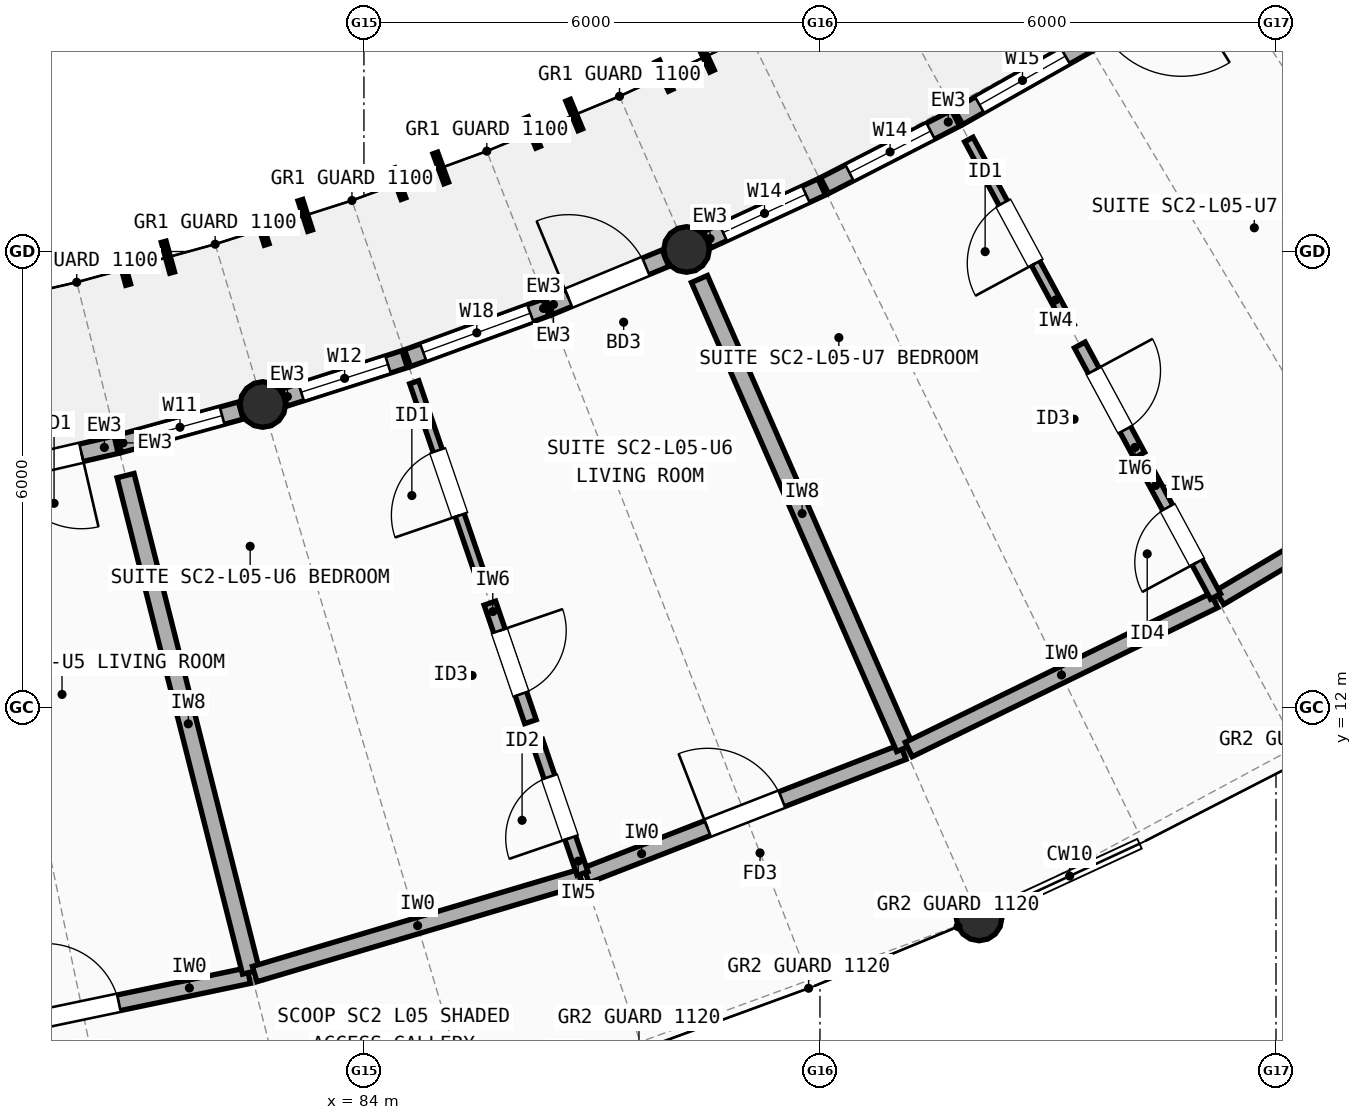
"""IFC4 building model, lengths in metres.
Left out: names, types, materials, properties, quantities, classifications, styles, units other than length and angle.
Written with IfcOpenShell. Run it as: python <this file> out.ifc"""

import sys

from ifc_helpers import new_model, si_unit, direction, frame, frame_2d, origin, origin_2d, place, context, subcontext, project, spatial, rectangle, circle, extrude, element, fill, save


model = new_model("IFC4")
c1 = context("Model", 3, precision=1e-05, world=origin(), true_north=direction((0.0, 1.0)))
c2 = subcontext(c1, "Body", "Model", "MODEL_VIEW")
j1 = project(units=[si_unit("LENGTHUNIT", "METRE"), si_unit("PLANEANGLEUNIT", "RADIAN")], contexts=[c1])
p1 = place(None, origin())
s1 = spatial("IfcSite", under=j1, at=p1, CompositionType="ELEMENT")
p2 = place(p1, origin())
s2 = spatial("IfcBuilding", under=s1, at=p2, CompositionType="ELEMENT")
p3 = place(p2, frame((0.0, 0.0, 17.3)))
s3 = spatial("IfcBuildingStorey", under=s2, at=p3, CompositionType="ELEMENT", Elevation=17.3)
for number, where, z_axis, x_axis in (
    (1, (82.669, 15.988, 0.0), (0.0, 0.0, 1.0), (1.0, 0.0, 0.0)),
    (2, (88.245, 18.027, 0.0), (0.0, 0.0, 1.0), (1.0, 0.0, 0.0)),
    (3, (92.094, 9.232, 0.0), (0.0, 0.0, 1.0), (1.0, 0.0, 0.0)),
):
    element("IfcColumn", number, at=place(p3, frame(where, z_axis=z_axis, x_axis=x_axis)), inside=s3, PredefinedType="COLUMN", context=c2, shape_type="SweptSolid", body=[
        extrude(circle(Radius=0.3, at=origin_2d()), origin(), (0.0, 0.0, 1.0), 2.94),
    ])
p4 = place(p3, frame((78.85, 15.022, 0.0), z_axis=(0.0, 0.0, 1.0), x_axis=(0.974359373104, 0.224997360081, 0.0)))
e4 = element("IfcWall", 4, at=p4, inside=s3, PredefinedType="STANDARD", context=c2, shape_type="SweptSolid", body=[
    extrude(rectangle(XDim=1.94, YDim=0.235, at=frame_2d((0.97, 0.0))), origin(), (0.0, 0.0, 1.0), 2.676),
])
p5 = place(p4, frame((0.47, 0.0, 0.0)))
e5 = element("IfcOpeningElement", 5, at=p5, cuts=e4, PredefinedType="OPENING", context=c2, shape_type="SweptSolid", body=[
    extrude(rectangle(XDim=1.0, YDim=2.15, at=frame_2d((0.5, 1.075))), frame((0.0, 0.127, 0.0), z_axis=(0.0, -1.0, 0.0), x_axis=(1.0, 0.0, 0.0)), (0.0, 0.0, 1.0), 0.255),
])
p6 = place(p3, frame((80.779, 15.468, 0.0), z_axis=(0.0, 0.0, 1.0), x_axis=(0.964276805489, 0.264896663619, 0.0)))
e6 = element("IfcWall", 6, at=p6, inside=s3, PredefinedType="STANDARD", context=c2, shape_type="SweptSolid", body=[
    extrude(rectangle(XDim=1.66, YDim=0.235, at=frame_2d((0.83, 0.0))), origin(), (0.0, 0.0, 1.0), 2.676),
])
p7 = place(p6, frame((0.255, 0.0, 0.85)))
e7 = element("IfcOpeningElement", 7, at=p7, cuts=e6, PredefinedType="OPENING", context=c2, shape_type="SweptSolid", body=[
    extrude(rectangle(XDim=1.15, YDim=1.45, at=frame_2d((0.575, 0.725))), frame((0.0, 0.127, 0.0), z_axis=(0.0, -1.0, 0.0), x_axis=(1.0, 0.0, 0.0)), (0.0, 0.0, 1.0), 0.255),
])
p8 = place(p3, frame((82.955, 16.079, 0.0), z_axis=(0.0, 0.0, 1.0), x_axis=(0.952523149859, 0.304466170508, 0.0)))
e8 = element("IfcWall", 8, at=p8, inside=s3, PredefinedType="STANDARD", context=c2, shape_type="SweptSolid", body=[
    extrude(rectangle(XDim=1.66, YDim=0.235, at=frame_2d((0.83, 0.0))), origin(), (0.0, 0.0, 1.0), 2.676),
])
p9 = place(p8, frame((0.23, 0.0, 0.85)))
e9 = element("IfcOpeningElement", 9, at=p9, cuts=e8, PredefinedType="OPENING", context=c2, shape_type="SweptSolid", body=[
    extrude(rectangle(XDim=1.2, YDim=1.35, at=frame_2d((0.6, 0.675))), frame((0.0, 0.127, 0.0), z_axis=(0.0, -1.0, 0.0), x_axis=(1.0, 0.0, 0.0)), (0.0, 0.0, 1.0), 0.255),
])
p10 = place(p3, frame((84.574, 16.597, 0.0), z_axis=(0.0, 0.0, 1.0), x_axis=(0.939178301307, 0.343429932235, 0.0)))
e10 = element("IfcWall", 10, at=p10, inside=s3, PredefinedType="STANDARD", context=c2, shape_type="SweptSolid", body=[
    extrude(rectangle(XDim=1.94, YDim=0.235, at=frame_2d((0.97, 0.0))), origin(), (0.0, 0.0, 1.0), 2.676),
])
p11 = place(p10, frame((0.22, 0.0, 0.85)))
e11 = element("IfcOpeningElement", 11, at=p11, cuts=e10, PredefinedType="OPENING", context=c2, shape_type="SweptSolid", body=[
    extrude(rectangle(XDim=1.5, YDim=1.4, at=frame_2d((0.75, 0.7))), frame((0.0, 0.127, 0.0), z_axis=(0.0, -1.0, 0.0), x_axis=(1.0, 0.0, 0.0)), (0.0, 0.0, 1.0), 0.255),
])
p12 = place(p3, frame((86.433, 17.278, 0.0), z_axis=(0.0, 0.0, 1.0), x_axis=(0.924165494985, 0.38199232699, 0.0)))
e12 = element("IfcWall", 12, at=p12, inside=s3, PredefinedType="STANDARD", context=c2, shape_type="SweptSolid", body=[
    extrude(rectangle(XDim=1.66, YDim=0.235, at=frame_2d((0.83, 0.0))), origin(), (0.0, 0.0, 1.0), 2.676),
])
p13 = place(p12, frame((0.28, 0.0, 0.0)))
e13 = element("IfcOpeningElement", 13, at=p13, cuts=e12, PredefinedType="OPENING", context=c2, shape_type="SweptSolid", body=[
    extrude(rectangle(XDim=1.1, YDim=2.15, at=frame_2d((0.55, 1.075))), frame((0.0, 0.127, 0.0), z_axis=(0.0, -1.0, 0.0), x_axis=(1.0, 0.0, 0.0)), (0.0, 0.0, 1.0), 0.255),
])
p14 = place(p3, frame((88.517, 18.153, 0.0), z_axis=(0.0, 0.0, 1.0), x_axis=(0.907575902742, 0.419888057418, 0.0)))
e14 = element("IfcWall", 14, at=p14, inside=s3, PredefinedType="STANDARD", context=c2, shape_type="SweptSolid", body=[
    extrude(rectangle(XDim=1.66, YDim=0.235, at=frame_2d((0.83, 0.0))), origin(), (0.0, 0.0, 1.0), 2.676),
])
p15 = place(p14, frame((0.23, 0.0, 0.85)))
e15 = element("IfcOpeningElement", 15, at=p15, cuts=e14, PredefinedType="OPENING", context=c2, shape_type="SweptSolid", body=[
    extrude(rectangle(XDim=1.2, YDim=1.5, at=frame_2d((0.6, 0.75))), frame((0.0, 0.127, 0.0), z_axis=(0.0, -1.0, 0.0), x_axis=(1.0, 0.0, 0.0)), (0.0, 0.0, 1.0), 0.255),
])
p16 = place(p3, frame((90.06, 18.867, 0.0), z_axis=(0.0, 0.0, 1.0), x_axis=(0.889517261343, 0.456901566832, 0.0)))
e16 = element("IfcWall", 16, at=p16, inside=s3, PredefinedType="STANDARD", context=c2, shape_type="SweptSolid", body=[
    extrude(rectangle(XDim=1.94, YDim=0.235, at=frame_2d((0.97, 0.0))), origin(), (0.0, 0.0, 1.0), 2.676),
])
p17 = place(p16, frame((0.37, 0.0, 0.85)))
e17 = element("IfcOpeningElement", 17, at=p17, cuts=e16, PredefinedType="OPENING", context=c2, shape_type="SweptSolid", body=[
    extrude(rectangle(XDim=1.2, YDim=1.5, at=frame_2d((0.6, 0.75))), frame((0.0, 0.127, 0.0), z_axis=(0.0, -1.0, 0.0), x_axis=(1.0, 0.0, 0.0)), (0.0, 0.0, 1.0), 0.255),
])
p18 = place(p3, frame((91.821, 19.772, 0.0), z_axis=(0.0, 0.0, 1.0), x_axis=(0.86993400964, 0.493168144623, 0.0)))
e18 = element("IfcWall", 18, at=p18, inside=s3, PredefinedType="STANDARD", context=c2, shape_type="SweptSolid", body=[
    extrude(rectangle(XDim=1.94, YDim=0.235, at=frame_2d((0.97, 0.0))), origin(), (0.0, 0.0, 1.0), 2.676),
])
p19 = place(p18, frame((0.32, 0.0, 0.85)))
e19 = element("IfcOpeningElement", 19, at=p19, cuts=e18, PredefinedType="OPENING", context=c2, shape_type="SweptSolid", body=[
    extrude(rectangle(XDim=1.3, YDim=1.45, at=frame_2d((0.65, 0.725))), frame((0.0, 0.127, 0.0), z_axis=(0.0, -1.0, 0.0), x_axis=(1.0, 0.0, 0.0)), (0.0, 0.0, 1.0), 0.255),
])
p20 = place(p3, frame((78.107, 7.558, 0.0), z_axis=(0.0, 0.0, 1.0), x_axis=(0.978806148413, 0.204788973894, 0.0)))
e20 = element("IfcWall", 20, at=p20, inside=s3, PredefinedType="SOLIDWALL", context=c2, shape_type="SweptSolid", body=[
    extrude(rectangle(XDim=4.473, YDim=0.21, at=frame_2d((2.236, 0.0))), origin(), (0.0, 0.0, 1.0), 2.754),
])
p21 = place(p20, frame((1.747, 0.0, 0.0)))
e21 = element("IfcOpeningElement", 21, at=p21, cuts=e20, PredefinedType="OPENING", context=c2, shape_type="SweptSolid", body=[
    extrude(rectangle(XDim=0.98, YDim=2.15, at=frame_2d((0.49, 1.075))), frame((0.0, 0.115, 0.0), z_axis=(0.0, -1.0, 0.0), x_axis=(1.0, 0.0, 0.0)), (0.0, 0.0, 1.0), 0.23),
])
p22 = place(p3, frame((80.864, 15.052, 0.0), z_axis=(0.0, 0.0, 1.0), x_axis=(0.244982481903, -0.969527505314, 0.0)))
e22 = element("IfcWall", 22, at=p22, inside=s3, PredefinedType="SOLIDWALL", context=c2, shape_type="SweptSolid", body=[
    extrude(rectangle(XDim=6.736, YDim=0.23, at=frame_2d((3.368, 0.0))), origin(), (0.0, 0.0, 1.0), 2.714),
])
p23 = place(p3, frame((82.562, 8.494, 0.0), z_axis=(0.0, 0.0, 1.0), x_axis=(0.958602413557, 0.28474798107, 0.0)))
e23 = element("IfcWall", 23, at=p23, inside=s3, PredefinedType="SOLIDWALL", context=c2, shape_type="SweptSolid", body=[
    extrude(rectangle(XDim=4.473, YDim=0.21, at=frame_2d((2.236, 0.0))), origin(), (0.0, 0.0, 1.0), 2.734),
])
p24 = place(p3, frame((86.926, 9.793, 0.0), z_axis=(0.0, 0.0, 1.0), x_axis=(0.931847867525, 0.362849213571, 0.0)))
e24 = element("IfcWall", 24, at=p24, inside=s3, PredefinedType="SOLIDWALL", context=c2, shape_type="SweptSolid", body=[
    extrude(rectangle(XDim=4.473, YDim=0.21, at=frame_2d((2.237, 0.0))), origin(), (0.0, 0.0, 1.0), 2.714),
])
p25 = place(p24, frame((1.712, 0.0, 0.0)))
e25 = element("IfcOpeningElement", 25, at=p25, cuts=e24, PredefinedType="OPENING", context=c2, shape_type="SweptSolid", body=[
    extrude(rectangle(XDim=1.05, YDim=2.15, at=frame_2d((0.525, 1.075))), frame((0.0, 0.115, 0.0), z_axis=(0.0, -1.0, 0.0), x_axis=(1.0, 0.0, 0.0)), (0.0, 0.0, 1.0), 0.23),
])
p26 = place(p3, frame((84.662, 16.28, 0.0), z_axis=(0.0, 0.0, 1.0), x_axis=(0.32401221778, -0.94605289637, 0.0)))
e26 = element("IfcWall", 26, at=p26, inside=s3, PredefinedType="PARTITIONING", context=c2, shape_type="SweptSolid", body=[
    extrude(rectangle(XDim=2.8, YDim=0.125, at=frame_2d((1.4, 0.0))), origin(), (0.0, 0.0, 1.0), 2.754),
])
p27 = place(p26, frame((0.95, 0.0, 0.0)))
e27 = element("IfcOpeningElement", 27, at=p27, cuts=e26, PredefinedType="OPENING", context=c2, shape_type="SweptSolid", body=[
    extrude(rectangle(XDim=0.9, YDim=2.1, at=frame_2d((0.45, 1.05))), frame((0.0, 0.073, 0.0), z_axis=(0.0, -1.0, 0.0), x_axis=(1.0, 0.0, 0.0)), (0.0, 0.0, 1.0), 0.145),
])
p28 = place(p3, frame((85.657, 13.374, 0.0), z_axis=(0.0, 0.0, 1.0), x_axis=(0.324127376206, -0.946013448104, 0.0)))
e28 = element("IfcWall", 28, at=p28, inside=s3, PredefinedType="PLUMBINGWALL", context=c2, shape_type="SweptSolid", body=[
    extrude(rectangle(XDim=1.648, YDim=0.16, at=frame_2d((0.824, 0.0))), origin(), (0.0, 0.0, 1.0), 2.754),
])
p29 = place(p28, frame((0.384, 0.0, 0.0)))
e29 = element("IfcOpeningElement", 29, at=p29, cuts=e28, PredefinedType="OPENING", context=c2, shape_type="SweptSolid", body=[
    extrude(rectangle(XDim=0.88, YDim=2.1, at=frame_2d((0.44, 1.05))), frame((0.0, 0.09, 0.0), z_axis=(0.0, -1.0, 0.0), x_axis=(1.0, 0.0, 0.0)), (0.0, 0.0, 1.0), 0.18),
])
p30 = place(p3, frame((86.279, 11.558, 0.0), z_axis=(0.0, 0.0, 1.0), x_axis=(0.323978335312, -0.946064500046, 0.0)))
e30 = element("IfcWall", 30, at=p30, inside=s3, PredefinedType="PARTITIONING", context=c2, shape_type="SweptSolid", body=[
    extrude(rectangle(XDim=1.84, YDim=0.15, at=frame_2d((0.92, 0.0))), origin(), (0.0, 0.0, 1.0), 2.754),
])
p31 = place(p30, frame((0.495, 0.0, 0.0)))
e31 = element("IfcOpeningElement", 31, at=p31, cuts=e30, PredefinedType="OPENING", context=c2, shape_type="SweptSolid", body=[
    extrude(rectangle(XDim=0.85, YDim=2.1, at=frame_2d((0.425, 1.05))), frame((0.0, 0.085, 0.0), z_axis=(0.0, -1.0, 0.0), x_axis=(1.0, 0.0, 0.0)), (0.0, 0.0, 1.0), 0.17),
])
p32 = place(p3, frame((88.415, 17.638, 0.0), z_axis=(0.0, 0.0, 1.0), x_axis=(0.400932910895, -0.916107417807, 0.0)))
e32 = element("IfcWall", 32, at=p32, inside=s3, PredefinedType="SOLIDWALL", context=c2, shape_type="SweptSolid", body=[
    extrude(rectangle(XDim=6.736, YDim=0.23, at=frame_2d((3.368, 0.0))), origin(), (0.0, 0.0, 1.0), 2.734),
])
p33 = place(p3, frame((91.167, 11.448, 0.0), z_axis=(0.0, 0.0, 1.0), x_axis=(0.898794149603, 0.438370934985, 0.0)))
e33 = element("IfcWall", 33, at=p33, inside=s3, PredefinedType="SOLIDWALL", context=c2, shape_type="SweptSolid", body=[
    extrude(rectangle(XDim=4.473, YDim=0.21, at=frame_2d((2.236, 0.0))), origin(), (0.0, 0.0, 1.0), 2.754),
])
p34 = place(p3, frame((95.258, 13.447, 0.0), z_axis=(0.0, 0.0, 1.0), x_axis=(0.859614290038, 0.510943511909, 0.0)))
e34 = element("IfcWall", 34, at=p34, inside=s3, PredefinedType="SOLIDWALL", context=c2, shape_type="SweptSolid", body=[
    extrude(rectangle(XDim=4.473, YDim=0.21, at=frame_2d((2.236, 0.0))), origin(), (0.0, 0.0, 1.0), 2.734),
])
p35 = place(p34, frame((1.737, 0.0, 0.0)))
e35 = element("IfcOpeningElement", 35, at=p35, cuts=e34, PredefinedType="OPENING", context=c2, shape_type="SweptSolid", body=[
    extrude(rectangle(XDim=1.0, YDim=2.15, at=frame_2d((0.5, 1.075))), frame((0.0, 0.115, 0.0), z_axis=(0.0, -1.0, 0.0), x_axis=(1.0, 0.0, 0.0)), (0.0, 0.0, 1.0), 0.23),
])
p36 = place(p3, frame((91.959, 19.474, 0.0), z_axis=(0.0, 0.0, 1.0), x_axis=(0.475103009949, -0.879930184695, 0.0)))
e36 = element("IfcWall", 36, at=p36, inside=s3, PredefinedType="PARTITIONING", context=c2, shape_type="SweptSolid", body=[
    extrude(rectangle(XDim=2.8, YDim=0.125, at=frame_2d((1.4, 0.0))), origin(), (0.0, 0.0, 1.0), 2.714),
])
p37 = place(p36, frame((0.95, 0.0, 0.0)))
e37 = element("IfcOpeningElement", 37, at=p37, cuts=e36, PredefinedType="OPENING", context=c2, shape_type="SweptSolid", body=[
    extrude(rectangle(XDim=0.9, YDim=2.1, at=frame_2d((0.45, 1.05))), frame((0.0, 0.073, 0.0), z_axis=(0.0, -1.0, 0.0), x_axis=(1.0, 0.0, 0.0)), (0.0, 0.0, 1.0), 0.145),
])
p38 = place(p3, frame((93.418, 16.771, 0.0), z_axis=(0.0, 0.0, 1.0), x_axis=(0.475080097018, -0.879942555749, 0.0)))
e38 = element("IfcWall", 38, at=p38, inside=s3, PredefinedType="PLUMBINGWALL", context=c2, shape_type="SweptSolid", body=[
    extrude(rectangle(XDim=1.648, YDim=0.16, at=frame_2d((0.824, 0.0))), origin(), (0.0, 0.0, 1.0), 2.714),
])
p39 = place(p38, frame((0.384, 0.0, 0.0)))
e39 = element("IfcOpeningElement", 39, at=p39, cuts=e38, PredefinedType="OPENING", context=c2, shape_type="SweptSolid", body=[
    extrude(rectangle(XDim=0.88, YDim=2.1, at=frame_2d((0.44, 1.05))), frame((0.0, 0.09, 0.0), z_axis=(0.0, -1.0, 0.0), x_axis=(1.0, 0.0, 0.0)), (0.0, 0.0, 1.0), 0.18),
])
p40 = place(p3, frame((94.331, 15.081, 0.0), z_axis=(0.0, 0.0, 1.0), x_axis=(0.475017414672, -0.879976395001, 0.0)))
e40 = element("IfcWall", 40, at=p40, inside=s3, PredefinedType="PARTITIONING", context=c2, shape_type="SweptSolid", body=[
    extrude(rectangle(XDim=1.84, YDim=0.15, at=frame_2d((0.92, 0.0))), origin(), (0.0, 0.0, 1.0), 2.714),
])
p41 = place(p40, frame((0.51, 0.0, 0.0)))
e41 = element("IfcOpeningElement", 41, at=p41, cuts=e40, PredefinedType="OPENING", context=c2, shape_type="SweptSolid", body=[
    extrude(rectangle(XDim=0.82, YDim=2.08, at=frame_2d((0.41, 1.04))), frame((0.0, 0.085, 0.0), z_axis=(0.0, -1.0, 0.0), x_axis=(1.0, 0.0, 0.0)), (0.0, 0.0, 1.0), 0.17),
])
p42 = place(p5, origin())
e42 = element("IfcDoor", 42, at=p42, inside=s3, OperationType="SINGLE_SWING_RIGHT", PredefinedType="DOOR", context=c2, shape_type="SweptSolid", body=[
    extrude(rectangle(XDim=1.0, YDim=2.15, at=frame_2d((0.5, 1.075))), frame((0.0, 0.025, 0.0), z_axis=(0.0, -1.0, 0.0), x_axis=(1.0, 0.0, 0.0)), (0.0, 0.0, 1.0), 0.05),
])
fill(e5, e42)
p43 = place(p7, origin())
e43 = element("IfcWindow", 43, at=p43, inside=s3, PartitioningType="SINGLE_PANEL", PredefinedType="WINDOW", context=c2, shape_type="SweptSolid", body=[
    extrude(rectangle(XDim=1.15, YDim=1.45, at=frame_2d((0.575, 0.725))), frame((0.0, 0.03, 0.0), z_axis=(0.0, -1.0, 0.0), x_axis=(1.0, 0.0, 0.0)), (0.0, 0.0, 1.0), 0.06),
])
fill(e7, e43)
p44 = place(p9, origin())
e44 = element("IfcWindow", 44, at=p44, inside=s3, PartitioningType="SINGLE_PANEL", PredefinedType="WINDOW", context=c2, shape_type="SweptSolid", body=[
    extrude(rectangle(XDim=1.2, YDim=1.35, at=frame_2d((0.6, 0.675))), frame((0.0, 0.03, 0.0), z_axis=(0.0, -1.0, 0.0), x_axis=(1.0, 0.0, 0.0)), (0.0, 0.0, 1.0), 0.06),
])
fill(e9, e44)
p45 = place(p11, origin())
e45 = element("IfcWindow", 45, at=p45, inside=s3, PartitioningType="SINGLE_PANEL", PredefinedType="WINDOW", context=c2, shape_type="SweptSolid", body=[
    extrude(rectangle(XDim=1.5, YDim=1.4, at=frame_2d((0.75, 0.7))), frame((0.0, 0.03, 0.0), z_axis=(0.0, -1.0, 0.0), x_axis=(1.0, 0.0, 0.0)), (0.0, 0.0, 1.0), 0.06),
])
fill(e11, e45)
p46 = place(p13, origin())
e46 = element("IfcDoor", 46, at=p46, inside=s3, OperationType="SINGLE_SWING_LEFT", PredefinedType="DOOR", context=c2, shape_type="SweptSolid", body=[
    extrude(rectangle(XDim=1.1, YDim=2.15, at=frame_2d((0.55, 1.075))), frame((0.0, 0.025, 0.0), z_axis=(0.0, -1.0, 0.0), x_axis=(1.0, 0.0, 0.0)), (0.0, 0.0, 1.0), 0.05),
])
fill(e13, e46)
p47 = place(p15, origin())
e47 = element("IfcWindow", 47, at=p47, inside=s3, PartitioningType="SINGLE_PANEL", PredefinedType="WINDOW", context=c2, shape_type="SweptSolid", body=[
    extrude(rectangle(XDim=1.2, YDim=1.5, at=frame_2d((0.6, 0.75))), frame((0.0, 0.03, 0.0), z_axis=(0.0, -1.0, 0.0), x_axis=(1.0, 0.0, 0.0)), (0.0, 0.0, 1.0), 0.06),
])
fill(e15, e47)
p48 = place(p17, origin())
e48 = element("IfcWindow", 48, at=p48, inside=s3, PartitioningType="SINGLE_PANEL", PredefinedType="WINDOW", context=c2, shape_type="SweptSolid", body=[
    extrude(rectangle(XDim=1.2, YDim=1.5, at=frame_2d((0.6, 0.75))), frame((0.0, 0.03, 0.0), z_axis=(0.0, -1.0, 0.0), x_axis=(1.0, 0.0, 0.0)), (0.0, 0.0, 1.0), 0.06),
])
fill(e17, e48)
p49 = place(p19, origin())
e49 = element("IfcWindow", 49, at=p49, inside=s3, PartitioningType="SINGLE_PANEL", PredefinedType="WINDOW", context=c2, shape_type="SweptSolid", body=[
    extrude(rectangle(XDim=1.3, YDim=1.45, at=frame_2d((0.65, 0.725))), frame((0.0, 0.03, 0.0), z_axis=(0.0, -1.0, 0.0), x_axis=(1.0, 0.0, 0.0)), (0.0, 0.0, 1.0), 0.06),
])
fill(e19, e49)
p50 = place(p21, origin())
e50 = element("IfcDoor", 50, at=p50, inside=s3, OperationType="SINGLE_SWING_LEFT", PredefinedType="DOOR", context=c2, shape_type="SweptSolid", body=[
    extrude(rectangle(XDim=0.98, YDim=2.15, at=frame_2d((0.49, 1.075))), frame((0.0, 0.025, 0.0), z_axis=(0.0, -1.0, 0.0), x_axis=(1.0, 0.0, 0.0)), (0.0, 0.0, 1.0), 0.05),
])
fill(e21, e50)
p51 = place(p25, origin())
e51 = element("IfcDoor", 51, at=p51, inside=s3, OperationType="SINGLE_SWING_LEFT", PredefinedType="DOOR", context=c2, shape_type="SweptSolid", body=[
    extrude(rectangle(XDim=1.05, YDim=2.15, at=frame_2d((0.525, 1.075))), frame((0.0, 0.025, 0.0), z_axis=(0.0, -1.0, 0.0), x_axis=(1.0, 0.0, 0.0)), (0.0, 0.0, 1.0), 0.05),
])
fill(e25, e51)
p52 = place(p27, origin())
e52 = element("IfcDoor", 52, at=p52, inside=s3, OperationType="SINGLE_SWING_RIGHT", PredefinedType="DOOR", context=c2, shape_type="SweptSolid", body=[
    extrude(rectangle(XDim=0.9, YDim=2.1, at=frame_2d((0.45, 1.05))), frame((0.0, 0.025, 0.0), z_axis=(0.0, -1.0, 0.0), x_axis=(1.0, 0.0, 0.0)), (0.0, 0.0, 1.0), 0.05),
])
fill(e27, e52)
p53 = place(p29, origin())
e53 = element("IfcDoor", 53, at=p53, inside=s3, OperationType="SINGLE_SWING_LEFT", PredefinedType="DOOR", context=c2, shape_type="SweptSolid", body=[
    extrude(rectangle(XDim=0.88, YDim=2.1, at=frame_2d((0.44, 1.05))), frame((0.0, 0.025, 0.0), z_axis=(0.0, -1.0, 0.0), x_axis=(1.0, 0.0, 0.0)), (0.0, 0.0, 1.0), 0.05),
])
fill(e29, e53)
p54 = place(p31, origin())
e54 = element("IfcDoor", 54, at=p54, inside=s3, OperationType="SINGLE_SWING_RIGHT", PredefinedType="DOOR", context=c2, shape_type="SweptSolid", body=[
    extrude(rectangle(XDim=0.85, YDim=2.1, at=frame_2d((0.425, 1.05))), frame((0.0, 0.025, 0.0), z_axis=(0.0, -1.0, 0.0), x_axis=(1.0, 0.0, 0.0)), (0.0, 0.0, 1.0), 0.05),
])
fill(e31, e54)
p55 = place(p37, origin())
e55 = element("IfcDoor", 55, at=p55, inside=s3, OperationType="SINGLE_SWING_RIGHT", PredefinedType="DOOR", context=c2, shape_type="SweptSolid", body=[
    extrude(rectangle(XDim=0.9, YDim=2.1, at=frame_2d((0.45, 1.05))), frame((0.0, 0.025, 0.0), z_axis=(0.0, -1.0, 0.0), x_axis=(1.0, 0.0, 0.0)), (0.0, 0.0, 1.0), 0.05),
])
fill(e37, e55)
p56 = place(p39, origin())
e56 = element("IfcDoor", 56, at=p56, inside=s3, OperationType="SINGLE_SWING_LEFT", PredefinedType="DOOR", context=c2, shape_type="SweptSolid", body=[
    extrude(rectangle(XDim=0.88, YDim=2.1, at=frame_2d((0.44, 1.05))), frame((0.0, 0.025, 0.0), z_axis=(0.0, -1.0, 0.0), x_axis=(1.0, 0.0, 0.0)), (0.0, 0.0, 1.0), 0.05),
])
fill(e39, e56)
p57 = place(p41, origin())
e57 = element("IfcDoor", 57, at=p57, inside=s3, OperationType="SINGLE_SWING_RIGHT", PredefinedType="DOOR", context=c2, shape_type="SweptSolid", body=[
    extrude(rectangle(XDim=0.82, YDim=2.08, at=frame_2d((0.41, 1.04))), frame((0.0, 0.025, 0.0), z_axis=(0.0, -1.0, 0.0), x_axis=(1.0, 0.0, 0.0)), (0.0, 0.0, 1.0), 0.05),
])
fill(e41, e57)
save(model, sys.argv[1])
